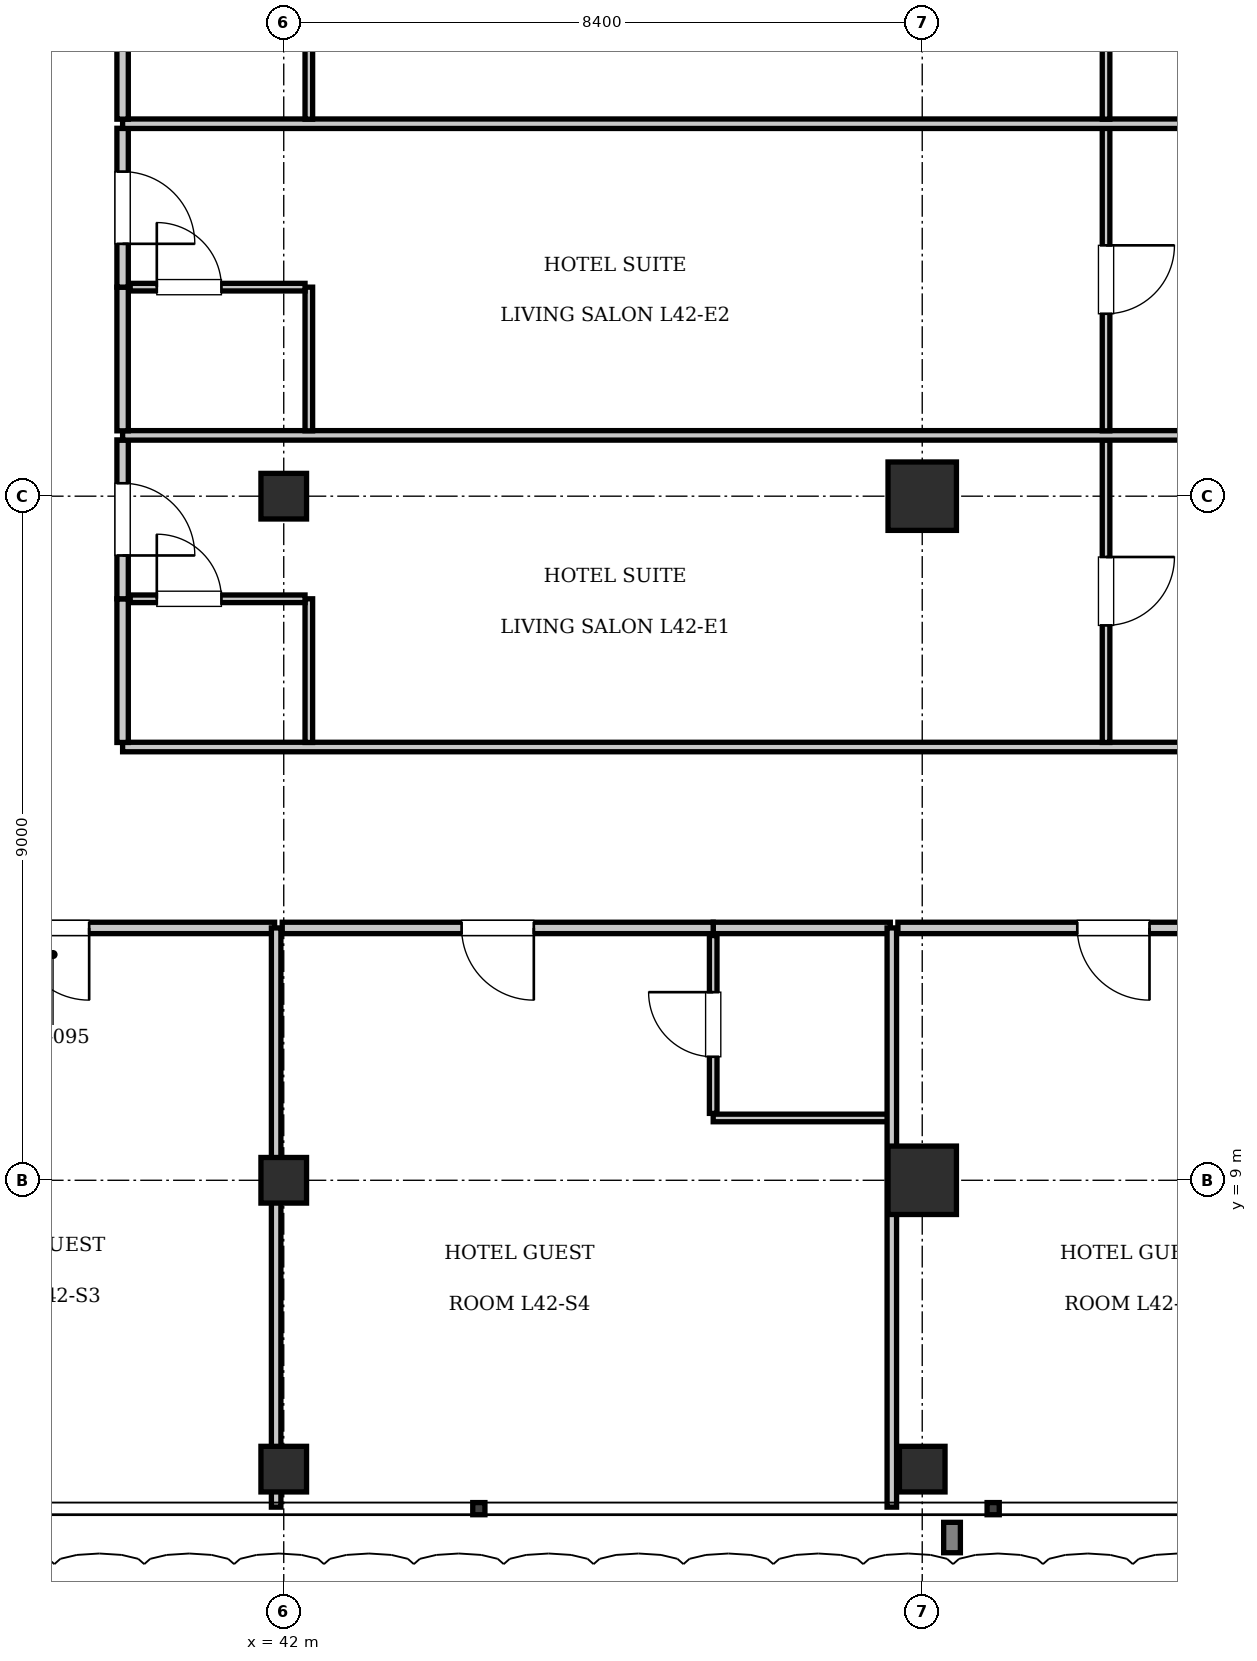
"""IFC4 building model, lengths in metres.
Left out: names, types, materials, properties, quantities, classifications, styles, units other than length and angle.
Written with IfcOpenShell. Run it as: python <this file> out.ifc"""

import sys

from ifc_helpers import new_model, si_unit, direction, frame, frame_2d, origin, origin_2d, place, context, subcontext, project, spatial, rectangle, i_section, extrude, element, fill, save


model = new_model("IFC4")
c1 = context("Model", 3, precision=1e-05, world=origin(), true_north=direction((0.0, 1.0)))
c2 = subcontext(c1, "Body", "Model", "MODEL_VIEW")
j1 = project(units=[si_unit("LENGTHUNIT", "METRE"), si_unit("PLANEANGLEUNIT", "RADIAN")], contexts=[c1])
p1 = place(None, origin())
s1 = spatial("IfcSite", under=j1, at=p1, CompositionType="ELEMENT")
p2 = place(p1, origin())
s2 = spatial("IfcBuilding", under=s1, at=p2, CompositionType="ELEMENT")
p3 = place(p2, frame((0.0, 0.0, 173.6)))
s3 = spatial("IfcBuildingStorey", under=s2, at=p3, CompositionType="ELEMENT", Elevation=173.6)
for number, where, z_axis, x_axis in (
    (1, (50.4, 18.0, 0.0), (0.0, 0.0, 1.0), (1.0, 0.0, 0.0)),
    (2, (50.4, 9.0, 0.0), (0.0, 0.0, 1.0), (1.0, 0.0, 0.0)),
):
    element("IfcColumn", number, at=place(p3, frame(where, z_axis=z_axis, x_axis=x_axis)), inside=s3, PredefinedType="COLUMN", context=c2, shape_type="SweptSolid", body=[
        extrude(rectangle(XDim=0.9, YDim=0.9, at=origin_2d()), origin(), (0.0, 0.0, 1.0), 3.85),
    ])
for number, where, z_axis, x_axis in (
    (3, (42.0, 9.0, 0.0), (0.0, 0.0, 1.0), (1.0, 0.0, 0.0)),
    (4, (42.0, 18.0, 0.0), (0.0, 0.0, 1.0), (1.0, 0.0, 0.0)),
    (5, (42.0, 5.2, 0.0), (0.0, 0.0, 1.0), (1.0, 0.0, 0.0)),
    (6, (50.4, 5.2, 0.0), (0.0, 0.0, 1.0), (1.0, 0.0, 0.0)),
):
    element("IfcColumn", number, at=place(p3, frame(where, z_axis=z_axis, x_axis=x_axis)), inside=s3, PredefinedType="COLUMN", context=c2, shape_type="SweptSolid", body=[
        extrude(i_section(OverallWidth=0.6, OverallDepth=0.6, WebThickness=0.025, FlangeThickness=0.038, at=origin_2d()), origin(), (0.0, 0.0, 1.0), 3.85),
    ])
p4 = place(p3, frame((36.05, 12.32, 0.0), z_axis=(0.0, 0.0, 1.0), x_axis=(1.0, 0.0, 0.0)))
e7 = element("IfcWall", 7, at=p4, inside=s3, PredefinedType="PARTITIONING", context=c2, shape_type="SweptSolid", body=[
    extrude(rectangle(XDim=5.83, YDim=0.15, at=frame_2d((2.915, 0.0))), origin(), (0.0, 0.0, 1.0), 3.61),
])
p5 = place(p4, frame((2.44, 0.0, 0.0)))
e8 = element("IfcOpeningElement", 8, at=p5, cuts=e7, PredefinedType="OPENING", context=c2, shape_type="SweptSolid", body=[
    extrude(rectangle(XDim=0.95, YDim=2.15, at=frame_2d((0.475, 1.075))), frame((0.0, 0.085, 0.0), z_axis=(0.0, -1.0, 0.0), x_axis=(1.0, 0.0, 0.0)), (0.0, 0.0, 1.0), 0.17),
])
p6 = place(p3, frame((41.9, 4.7, 0.0), z_axis=(0.0, 0.0, 1.0), x_axis=(0.0, 1.0, 0.0)))
e9 = element("IfcWall", 9, at=p6, inside=s3, PredefinedType="PARTITIONING", context=c2, shape_type="SweptSolid", body=[
    extrude(rectangle(XDim=7.62, YDim=0.125, at=frame_2d((3.81, 0.0))), origin(), (0.0, 0.0, 1.0), 3.007),
])
p7 = place(p3, frame((47.65, 12.32, 0.0), z_axis=(0.0, 0.0, 1.0), x_axis=(1.0, 0.0, 0.0)))
e10 = element("IfcWall", 10, at=p7, inside=s3, PredefinedType="PARTITIONING", context=c2, shape_type="SweptSolid", body=[
    extrude(rectangle(XDim=2.33, YDim=0.15, at=frame_2d((1.165, 0.0))), origin(), (0.0, 0.0, 1.0), 3.61),
])
p8 = place(p3, frame((47.65, 9.82, 0.0), z_axis=(0.0, 0.0, 1.0), x_axis=(1.0, 0.0, 0.0)))
e11 = element("IfcWall", 11, at=p8, inside=s3, PredefinedType="PARTITIONING", context=c2, shape_type="SweptSolid", body=[
    extrude(rectangle(XDim=2.31, YDim=0.1, at=frame_2d((1.155, 0.0))), origin(), (0.0, 0.0, 1.0), 3.61),
])
p9 = place(p3, frame((47.65, 9.88, 0.0), z_axis=(0.0, 0.0, 1.0), x_axis=(0.0, 1.0, 0.0)))
e12 = element("IfcWall", 12, at=p9, inside=s3, PredefinedType="PARTITIONING", context=c2, shape_type="SweptSolid", body=[
    extrude(rectangle(XDim=2.34, YDim=0.1, at=frame_2d((1.17, 0.0))), origin(), (0.0, 0.0, 1.0), 3.61),
])
p10 = place(p9, frame((0.745, 0.0, 0.0)))
e13 = element("IfcOpeningElement", 13, at=p10, cuts=e12, PredefinedType="OPENING", context=c2, shape_type="SweptSolid", body=[
    extrude(rectangle(XDim=0.85, YDim=2.1, at=frame_2d((0.425, 1.05))), frame((0.0, 0.06, 0.0), z_axis=(0.0, -1.0, 0.0), x_axis=(1.0, 0.0, 0.0)), (0.0, 0.0, 1.0), 0.12),
])
p11 = place(p3, frame((41.98, 12.32, 0.0), z_axis=(0.0, 0.0, 1.0), x_axis=(1.0, 0.0, 0.0)))
e14 = element("IfcWall", 14, at=p11, inside=s3, PredefinedType="PARTITIONING", context=c2, shape_type="SweptSolid", body=[
    extrude(rectangle(XDim=5.67, YDim=0.15, at=frame_2d((2.835, 0.0))), origin(), (0.0, 0.0, 1.0), 3.61),
])
p12 = place(p11, frame((2.36, 0.0, 0.0)))
e15 = element("IfcOpeningElement", 15, at=p12, cuts=e14, PredefinedType="OPENING", context=c2, shape_type="SweptSolid", body=[
    extrude(rectangle(XDim=0.95, YDim=2.15, at=frame_2d((0.475, 1.075))), frame((0.0, 0.085, 0.0), z_axis=(0.0, -1.0, 0.0), x_axis=(1.0, 0.0, 0.0)), (0.0, 0.0, 1.0), 0.17),
])
p13 = place(p3, frame((50.0, 4.7, 0.0), z_axis=(0.0, 0.0, 1.0), x_axis=(0.0, 1.0, 0.0)))
e16 = element("IfcWall", 16, at=p13, inside=s3, PredefinedType="PARTITIONING", context=c2, shape_type="SweptSolid", body=[
    extrude(rectangle(XDim=7.62, YDim=0.125, at=frame_2d((3.81, 0.0))), origin(), (0.0, 0.0, 1.0), 3.61),
])
p14 = place(p3, frame((50.08, 12.32, 0.0), z_axis=(0.0, 0.0, 1.0), x_axis=(1.0, 0.0, 0.0)))
e17 = element("IfcWall", 17, at=p14, inside=s3, PredefinedType="PARTITIONING", context=c2, shape_type="SweptSolid", body=[
    extrude(rectangle(XDim=5.67, YDim=0.15, at=frame_2d((2.835, 0.0))), origin(), (0.0, 0.0, 1.0), 3.61),
])
p15 = place(p14, frame((2.36, 0.0, 0.0)))
e18 = element("IfcOpeningElement", 18, at=p15, cuts=e17, PredefinedType="OPENING", context=c2, shape_type="SweptSolid", body=[
    extrude(rectangle(XDim=0.95, YDim=2.15, at=frame_2d((0.475, 1.075))), frame((0.0, 0.085, 0.0), z_axis=(0.0, -1.0, 0.0), x_axis=(1.0, 0.0, 0.0)), (0.0, 0.0, 1.0), 0.17),
])
p16 = place(p3, frame((39.88, 14.7, 0.0), z_axis=(0.0, 0.0, 1.0), x_axis=(1.0, 0.0, 0.0)))
e19 = element("IfcWall", 19, at=p16, inside=s3, PredefinedType="PARTITIONING", context=c2, shape_type="SweptSolid", body=[
    extrude(rectangle(XDim=22.52, YDim=0.125, at=frame_2d((11.26, 0.0))), origin(), (0.0, 0.0, 1.0), 3.61),
])
p17 = place(p3, frame((39.88, 14.76, 0.0), z_axis=(0.0, 0.0, 1.0), x_axis=(0.0, 1.0, 0.0)))
e20 = element("IfcWall", 20, at=p17, inside=s3, PredefinedType="PARTITIONING", context=c2, shape_type="SweptSolid", body=[
    extrude(rectangle(XDim=1.89, YDim=0.15, at=frame_2d((0.945, 0.0))), origin(), (0.0, 0.0, 1.0), 3.61),
])
p18 = place(p3, frame((39.88, 16.65, 0.0), z_axis=(0.0, 0.0, 1.0), x_axis=(0.0, 1.0, 0.0)))
e21 = element("IfcWall", 21, at=p18, inside=s3, PredefinedType="PARTITIONING", context=c2, shape_type="SweptSolid", body=[
    extrude(rectangle(XDim=2.09, YDim=0.15, at=frame_2d((1.045, 0.0))), origin(), (0.0, 0.0, 1.0), 3.61),
])
p19 = place(p18, frame((0.57, 0.0, 0.0)))
e22 = element("IfcOpeningElement", 22, at=p19, cuts=e21, PredefinedType="OPENING", context=c2, shape_type="SweptSolid", body=[
    extrude(rectangle(XDim=0.95, YDim=2.15, at=frame_2d((0.475, 1.075))), frame((0.0, 0.085, 0.0), z_axis=(0.0, -1.0, 0.0), x_axis=(1.0, 0.0, 0.0)), (0.0, 0.0, 1.0), 0.17),
])
p20 = place(p3, frame((42.33, 14.76, 0.0), z_axis=(0.0, 0.0, 1.0), x_axis=(0.0, 1.0, 0.0)))
e23 = element("IfcWall", 23, at=p20, inside=s3, PredefinedType="PARTITIONING", context=c2, shape_type="SweptSolid", body=[
    extrude(rectangle(XDim=1.89, YDim=0.1, at=frame_2d((0.945, 0.0))), origin(), (0.0, 0.0, 1.0), 3.61),
])
p21 = place(p3, frame((39.98, 16.65, 0.0), z_axis=(0.0, 0.0, 1.0), x_axis=(1.0, 0.0, 0.0)))
e24 = element("IfcWall", 24, at=p21, inside=s3, PredefinedType="PARTITIONING", context=c2, shape_type="SweptSolid", body=[
    extrude(rectangle(XDim=2.3, YDim=0.1, at=frame_2d((1.15, 0.0))), origin(), (0.0, 0.0, 1.0), 3.61),
])
p22 = place(p21, frame((0.35, 0.0, 0.0)))
e25 = element("IfcOpeningElement", 25, at=p22, cuts=e24, PredefinedType="OPENING", context=c2, shape_type="SweptSolid", body=[
    extrude(rectangle(XDim=0.85, YDim=2.1, at=frame_2d((0.425, 1.05))), frame((0.0, 0.06, 0.0), z_axis=(0.0, -1.0, 0.0), x_axis=(1.0, 0.0, 0.0)), (0.0, 0.0, 1.0), 0.12),
])
p23 = place(p3, frame((52.818, 14.76, 0.0), z_axis=(0.0, 0.0, 1.0), x_axis=(0.0, 1.0, 0.0)))
e26 = element("IfcWall", 26, at=p23, inside=s3, PredefinedType="PARTITIONING", context=c2, shape_type="SweptSolid", body=[
    extrude(rectangle(XDim=3.98, YDim=0.1, at=frame_2d((1.99, 0.0))), origin(), (0.0, 0.0, 1.0), 3.61),
])
p24 = place(p23, frame((1.54, 0.0, 0.0)))
e27 = element("IfcOpeningElement", 27, at=p24, cuts=e26, PredefinedType="OPENING", context=c2, shape_type="SweptSolid", body=[
    extrude(rectangle(XDim=0.9, YDim=2.1, at=frame_2d((0.45, 1.05))), frame((0.0, 0.06, 0.0), z_axis=(0.0, -1.0, 0.0), x_axis=(1.0, 0.0, 0.0)), (0.0, 0.0, 1.0), 0.12),
])
p25 = place(p3, frame((39.88, 18.8, 0.0), z_axis=(0.0, 0.0, 1.0), x_axis=(1.0, 0.0, 0.0)))
e28 = element("IfcWall", 28, at=p25, inside=s3, PredefinedType="PARTITIONING", context=c2, shape_type="SweptSolid", body=[
    extrude(rectangle(XDim=22.52, YDim=0.125, at=frame_2d((11.26, 0.0))), origin(), (0.0, 0.0, 1.0), 3.61),
])
p26 = place(p3, frame((39.88, 18.86, 0.0), z_axis=(0.0, 0.0, 1.0), x_axis=(0.0, 1.0, 0.0)))
e29 = element("IfcWall", 29, at=p26, inside=s3, PredefinedType="PARTITIONING", context=c2, shape_type="SweptSolid", body=[
    extrude(rectangle(XDim=1.89, YDim=0.15, at=frame_2d((0.945, 0.0))), origin(), (0.0, 0.0, 1.0), 3.61),
])
p27 = place(p3, frame((39.88, 20.75, 0.0), z_axis=(0.0, 0.0, 1.0), x_axis=(0.0, 1.0, 0.0)))
e30 = element("IfcWall", 30, at=p27, inside=s3, PredefinedType="PARTITIONING", context=c2, shape_type="SweptSolid", body=[
    extrude(rectangle(XDim=2.09, YDim=0.15, at=frame_2d((1.045, 0.0))), origin(), (0.0, 0.0, 1.0), 3.61),
])
p28 = place(p27, frame((0.57, 0.0, 0.0)))
e31 = element("IfcOpeningElement", 31, at=p28, cuts=e30, PredefinedType="OPENING", context=c2, shape_type="SweptSolid", body=[
    extrude(rectangle(XDim=0.95, YDim=2.15, at=frame_2d((0.475, 1.075))), frame((0.0, 0.085, 0.0), z_axis=(0.0, -1.0, 0.0), x_axis=(1.0, 0.0, 0.0)), (0.0, 0.0, 1.0), 0.17),
])
p29 = place(p3, frame((42.33, 18.86, 0.0), z_axis=(0.0, 0.0, 1.0), x_axis=(0.0, 1.0, 0.0)))
e32 = element("IfcWall", 32, at=p29, inside=s3, PredefinedType="PARTITIONING", context=c2, shape_type="SweptSolid", body=[
    extrude(rectangle(XDim=1.89, YDim=0.1, at=frame_2d((0.945, 0.0))), origin(), (0.0, 0.0, 1.0), 3.61),
])
p30 = place(p3, frame((39.98, 20.75, 0.0), z_axis=(0.0, 0.0, 1.0), x_axis=(1.0, 0.0, 0.0)))
e33 = element("IfcWall", 33, at=p30, inside=s3, PredefinedType="PARTITIONING", context=c2, shape_type="SweptSolid", body=[
    extrude(rectangle(XDim=2.3, YDim=0.1, at=frame_2d((1.15, 0.0))), origin(), (0.0, 0.0, 1.0), 3.61),
])
p31 = place(p30, frame((0.35, 0.0, 0.0)))
e34 = element("IfcOpeningElement", 34, at=p31, cuts=e33, PredefinedType="OPENING", context=c2, shape_type="SweptSolid", body=[
    extrude(rectangle(XDim=0.85, YDim=2.1, at=frame_2d((0.425, 1.05))), frame((0.0, 0.06, 0.0), z_axis=(0.0, -1.0, 0.0), x_axis=(1.0, 0.0, 0.0)), (0.0, 0.0, 1.0), 0.12),
])
p32 = place(p3, frame((52.818, 18.86, 0.0), z_axis=(0.0, 0.0, 1.0), x_axis=(0.0, 1.0, 0.0)))
e35 = element("IfcWall", 35, at=p32, inside=s3, PredefinedType="PARTITIONING", context=c2, shape_type="SweptSolid", body=[
    extrude(rectangle(XDim=3.98, YDim=0.1, at=frame_2d((1.99, 0.0))), origin(), (0.0, 0.0, 1.0), 3.61),
])
p33 = place(p32, frame((1.54, 0.0, 0.0)))
e36 = element("IfcOpeningElement", 36, at=p33, cuts=e35, PredefinedType="OPENING", context=c2, shape_type="SweptSolid", body=[
    extrude(rectangle(XDim=0.9, YDim=2.1, at=frame_2d((0.45, 1.05))), frame((0.0, 0.06, 0.0), z_axis=(0.0, -1.0, 0.0), x_axis=(1.0, 0.0, 0.0)), (0.0, 0.0, 1.0), 0.12),
])
p34 = place(p3, frame((39.88, 22.9, 0.0), z_axis=(0.0, 0.0, 1.0), x_axis=(1.0, 0.0, 0.0)))
e37 = element("IfcWall", 37, at=p34, inside=s3, PredefinedType="PARTITIONING", context=c2, shape_type="SweptSolid", body=[
    extrude(rectangle(XDim=22.52, YDim=0.125, at=frame_2d((11.26, 0.0))), origin(), (0.0, 0.0, 1.0), 3.61),
])
p35 = place(p3, frame((39.88, 22.96, 0.0), z_axis=(0.0, 0.0, 1.0), x_axis=(0.0, 1.0, 0.0)))
e38 = element("IfcWall", 38, at=p35, inside=s3, PredefinedType="PARTITIONING", context=c2, shape_type="SweptSolid", body=[
    extrude(rectangle(XDim=1.89, YDim=0.15, at=frame_2d((0.945, 0.0))), origin(), (0.0, 0.0, 1.0), 3.61),
])
p36 = place(p3, frame((42.33, 22.96, 0.0), z_axis=(0.0, 0.0, 1.0), x_axis=(0.0, 1.0, 0.0)))
e39 = element("IfcWall", 39, at=p36, inside=s3, PredefinedType="PARTITIONING", context=c2, shape_type="SweptSolid", body=[
    extrude(rectangle(XDim=1.89, YDim=0.1, at=frame_2d((0.945, 0.0))), origin(), (0.0, 0.0, 1.0), 3.61),
])
p37 = place(p3, frame((52.818, 22.96, 0.0), z_axis=(0.0, 0.0, 1.0), x_axis=(0.0, 1.0, 0.0)))
e40 = element("IfcWall", 40, at=p37, inside=s3, PredefinedType="PARTITIONING", context=c2, shape_type="SweptSolid", body=[
    extrude(rectangle(XDim=3.98, YDim=0.1, at=frame_2d((1.99, 0.0))), origin(), (0.0, 0.0, 1.0), 3.61),
])
p38 = place(p37, frame((1.54, 0.0, 0.0)))
e41 = element("IfcOpeningElement", 41, at=p38, cuts=e40, PredefinedType="OPENING", context=c2, shape_type="SweptSolid", body=[
    extrude(rectangle(XDim=0.9, YDim=2.1, at=frame_2d((0.45, 1.05))), frame((0.0, 0.06, 0.0), z_axis=(0.0, -1.0, 0.0), x_axis=(1.0, 0.0, 0.0)), (0.0, 0.0, 1.0), 0.12),
])
p39 = place(p5, frame((0.95, 0.0, 0.0), z_axis=(0.0, 0.0, 1.0), x_axis=(-1.0, 0.0, 0.0)))
e42 = element("IfcDoor", 42, at=p39, inside=s3, OperationType="SINGLE_SWING_LEFT", PredefinedType="DOOR", context=c2, shape_type="SweptSolid", body=[
    extrude(rectangle(XDim=0.95, YDim=2.15, at=frame_2d((0.475, 1.075))), frame((0.0, 0.025, 0.0), z_axis=(0.0, -1.0, 0.0), x_axis=(1.0, 0.0, 0.0)), (0.0, 0.0, 1.0), 0.05),
])
fill(e8, e42)
p40 = place(p10, origin())
e43 = element("IfcDoor", 43, at=p40, inside=s3, OperationType="SINGLE_SWING_RIGHT", PredefinedType="DOOR", context=c2, shape_type="SweptSolid", body=[
    extrude(rectangle(XDim=0.85, YDim=2.1, at=frame_2d((0.425, 1.05))), frame((0.0, 0.025, 0.0), z_axis=(0.0, -1.0, 0.0), x_axis=(1.0, 0.0, 0.0)), (0.0, 0.0, 1.0), 0.05),
])
fill(e13, e43)
p41 = place(p12, frame((0.95, 0.0, 0.0), z_axis=(0.0, 0.0, 1.0), x_axis=(-1.0, 0.0, 0.0)))
e44 = element("IfcDoor", 44, at=p41, inside=s3, OperationType="SINGLE_SWING_LEFT", PredefinedType="DOOR", context=c2, shape_type="SweptSolid", body=[
    extrude(rectangle(XDim=0.95, YDim=2.15, at=frame_2d((0.475, 1.075))), frame((0.0, 0.025, 0.0), z_axis=(0.0, -1.0, 0.0), x_axis=(1.0, 0.0, 0.0)), (0.0, 0.0, 1.0), 0.05),
])
fill(e15, e44)
p42 = place(p15, frame((0.95, 0.0, 0.0), z_axis=(0.0, 0.0, 1.0), x_axis=(-1.0, 0.0, 0.0)))
e45 = element("IfcDoor", 45, at=p42, inside=s3, OperationType="SINGLE_SWING_LEFT", PredefinedType="DOOR", context=c2, shape_type="SweptSolid", body=[
    extrude(rectangle(XDim=0.95, YDim=2.15, at=frame_2d((0.475, 1.075))), frame((0.0, 0.025, 0.0), z_axis=(0.0, -1.0, 0.0), x_axis=(1.0, 0.0, 0.0)), (0.0, 0.0, 1.0), 0.05),
])
fill(e18, e45)
p43 = place(p22, origin())
e46 = element("IfcDoor", 46, at=p43, inside=s3, OperationType="SINGLE_SWING_LEFT", PredefinedType="DOOR", context=c2, shape_type="SweptSolid", body=[
    extrude(rectangle(XDim=0.85, YDim=2.1, at=frame_2d((0.425, 1.05))), frame((0.0, 0.025, 0.0), z_axis=(0.0, -1.0, 0.0), x_axis=(1.0, 0.0, 0.0)), (0.0, 0.0, 1.0), 0.05),
])
fill(e25, e46)
p44 = place(p19, frame((0.95, 0.0, 0.0), z_axis=(0.0, 0.0, 1.0), x_axis=(-1.0, 0.0, 0.0)))
e47 = element("IfcDoor", 47, at=p44, inside=s3, OperationType="SINGLE_SWING_RIGHT", PredefinedType="DOOR", context=c2, shape_type="SweptSolid", body=[
    extrude(rectangle(XDim=0.95, YDim=2.15, at=frame_2d((0.475, 1.075))), frame((0.0, 0.025, 0.0), z_axis=(0.0, -1.0, 0.0), x_axis=(1.0, 0.0, 0.0)), (0.0, 0.0, 1.0), 0.05),
])
fill(e22, e47)
p45 = place(p24, frame((0.9, 0.0, 0.0), z_axis=(0.0, 0.0, 1.0), x_axis=(-1.0, 0.0, 0.0)))
e48 = element("IfcDoor", 48, at=p45, inside=s3, OperationType="SINGLE_SWING_LEFT", PredefinedType="DOOR", context=c2, shape_type="SweptSolid", body=[
    extrude(rectangle(XDim=0.9, YDim=2.1, at=frame_2d((0.45, 1.05))), frame((0.0, 0.025, 0.0), z_axis=(0.0, -1.0, 0.0), x_axis=(1.0, 0.0, 0.0)), (0.0, 0.0, 1.0), 0.05),
])
fill(e27, e48)
p46 = place(p31, origin())
e49 = element("IfcDoor", 49, at=p46, inside=s3, OperationType="SINGLE_SWING_LEFT", PredefinedType="DOOR", context=c2, shape_type="SweptSolid", body=[
    extrude(rectangle(XDim=0.85, YDim=2.1, at=frame_2d((0.425, 1.05))), frame((0.0, 0.025, 0.0), z_axis=(0.0, -1.0, 0.0), x_axis=(1.0, 0.0, 0.0)), (0.0, 0.0, 1.0), 0.05),
])
fill(e34, e49)
p47 = place(p28, frame((0.95, 0.0, 0.0), z_axis=(0.0, 0.0, 1.0), x_axis=(-1.0, 0.0, 0.0)))
e50 = element("IfcDoor", 50, at=p47, inside=s3, OperationType="SINGLE_SWING_RIGHT", PredefinedType="DOOR", context=c2, shape_type="SweptSolid", body=[
    extrude(rectangle(XDim=0.95, YDim=2.15, at=frame_2d((0.475, 1.075))), frame((0.0, 0.025, 0.0), z_axis=(0.0, -1.0, 0.0), x_axis=(1.0, 0.0, 0.0)), (0.0, 0.0, 1.0), 0.05),
])
fill(e31, e50)
p48 = place(p33, frame((0.9, 0.0, 0.0), z_axis=(0.0, 0.0, 1.0), x_axis=(-1.0, 0.0, 0.0)))
e51 = element("IfcDoor", 51, at=p48, inside=s3, OperationType="SINGLE_SWING_LEFT", PredefinedType="DOOR", context=c2, shape_type="SweptSolid", body=[
    extrude(rectangle(XDim=0.9, YDim=2.1, at=frame_2d((0.45, 1.05))), frame((0.0, 0.025, 0.0), z_axis=(0.0, -1.0, 0.0), x_axis=(1.0, 0.0, 0.0)), (0.0, 0.0, 1.0), 0.05),
])
fill(e36, e51)
save(model, sys.argv[1])
